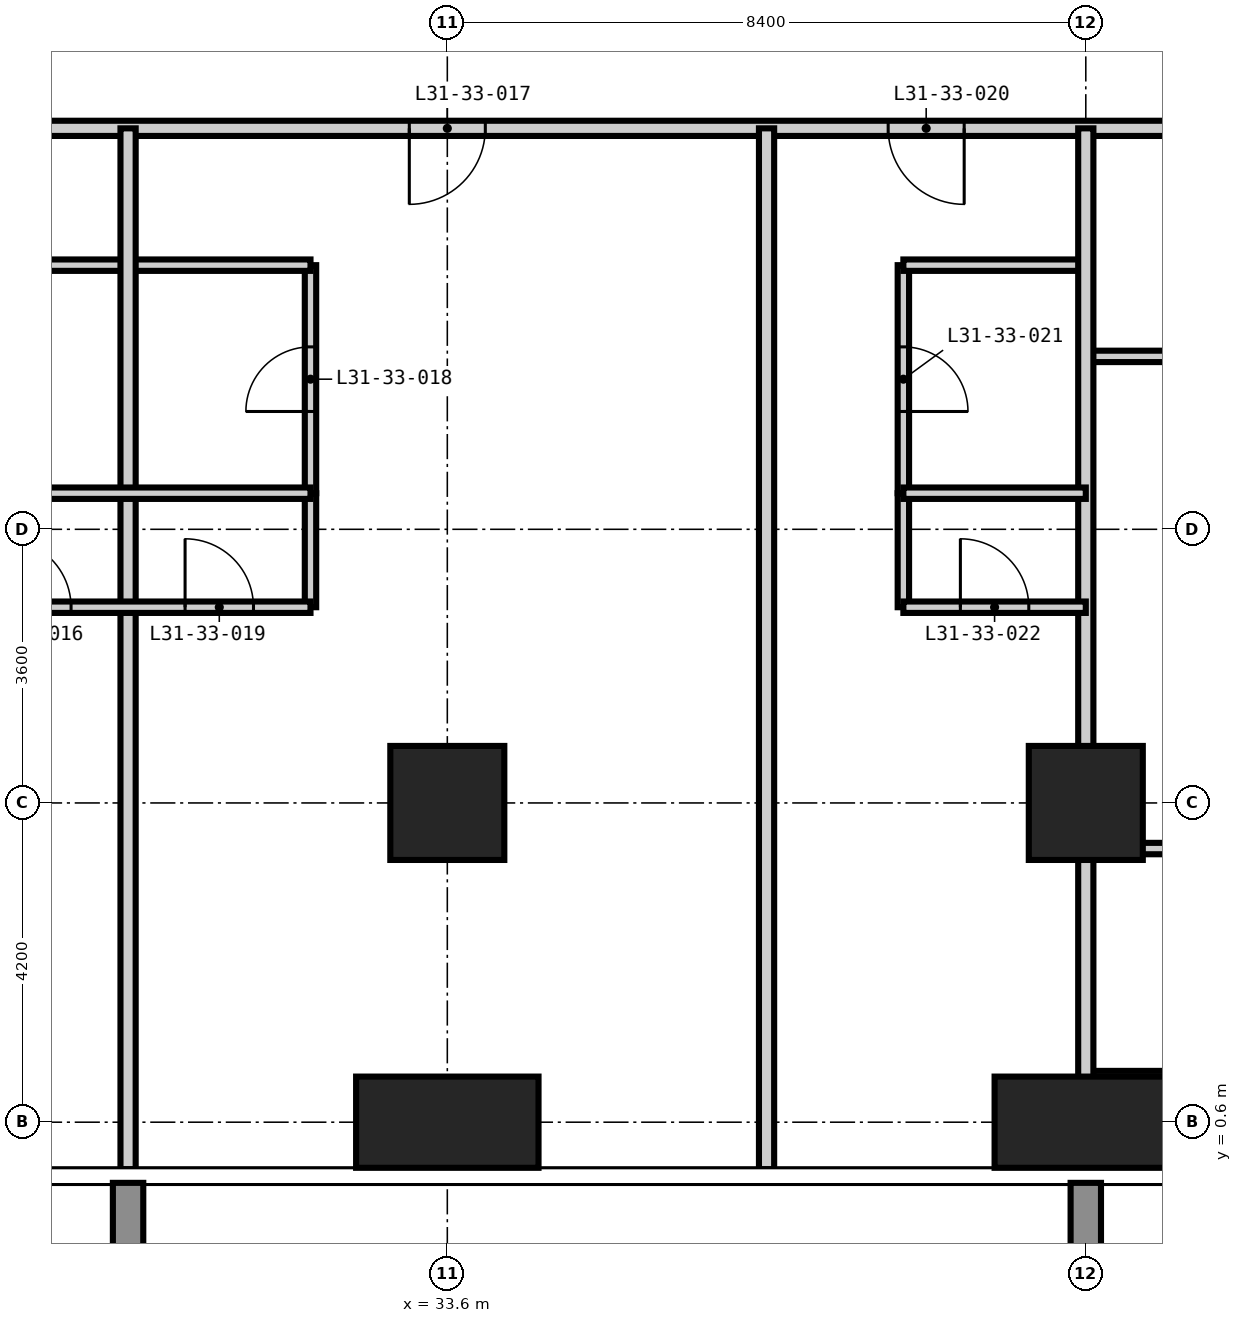
"""IFC4 building model, lengths in metres.
Left out: names, types, materials, properties, quantities, classifications, styles, units other than length and angle.
Written with IfcOpenShell. Run it as: python <this file> out.ifc"""

import sys

from ifc_helpers import new_model, si_unit, direction, frame, frame_2d, origin, origin_2d, place, context, subcontext, project, spatial, rectangle, extrude, element, fill, save


model = new_model("IFC4")
c1 = context("Model", 3, precision=1e-05, world=origin(), true_north=direction((0.0, 1.0)))
c2 = subcontext(c1, "Body", "Model", "MODEL_VIEW")
j1 = project(units=[si_unit("LENGTHUNIT", "METRE"), si_unit("PLANEANGLEUNIT", "RADIAN")], contexts=[c1])
p1 = place(None, origin())
s1 = spatial("IfcSite", under=j1, at=p1, CompositionType="ELEMENT")
p2 = place(p1, origin())
s2 = spatial("IfcBuilding", under=s1, at=p2, CompositionType="ELEMENT")
p3 = place(p2, frame((0.0, 0.0, 122.4)))
s3 = spatial("IfcBuildingStorey", under=s2, at=p3, CompositionType="ELEMENT", Elevation=122.4)
p4 = place(p3, frame((33.6, 0.6, -0.35), z_axis=(0.0, 0.0, 1.0), x_axis=(1.0, 0.0, 0.0)))
e1 = element("IfcColumn", 1, at=p4, inside=s3, PredefinedType="COLUMN", context=c2, shape_type="SweptSolid", body=[
    extrude(rectangle(XDim=2.4, YDim=1.2, at=origin_2d()), origin(), (0.0, 0.0, 1.0), 3.6),
])
p5 = place(p3, frame((33.6, 4.8, -0.35), z_axis=(0.0, 0.0, 1.0), x_axis=(1.0, 0.0, 0.0)))
e2 = element("IfcColumn", 2, at=p5, inside=s3, PredefinedType="COLUMN", context=c2, shape_type="SweptSolid", body=[
    extrude(rectangle(XDim=1.5, YDim=1.5, at=origin_2d()), origin(), (0.0, 0.0, 1.0), 3.6),
])
p6 = place(p3, frame((42.0, 0.6, -0.35), z_axis=(0.0, 0.0, 1.0), x_axis=(1.0, 0.0, 0.0)))
e3 = element("IfcColumn", 3, at=p6, inside=s3, PredefinedType="COLUMN", context=c2, shape_type="SweptSolid", body=[
    extrude(rectangle(XDim=2.4, YDim=1.2, at=origin_2d()), origin(), (0.0, 0.0, 1.0), 3.6),
])
p7 = place(p3, frame((42.0, 4.8, -0.35), z_axis=(0.0, 0.0, 1.0), x_axis=(1.0, 0.0, 0.0)))
e4 = element("IfcColumn", 4, at=p7, inside=s3, PredefinedType="COLUMN", context=c2, shape_type="SweptSolid", body=[
    extrude(rectangle(XDim=1.5, YDim=1.5, at=origin_2d()), origin(), (0.0, 0.0, 1.0), 3.6),
])
p8 = place(p3, frame((31.8, 8.875, 0.0), z_axis=(0.0, 0.0, 1.0), x_axis=(0.0, 1.0, 0.0)))
e5 = element("IfcWall", 5, at=p8, inside=s3, PredefinedType="PARTITIONING", context=c2, shape_type="SweptSolid", body=[
    extrude(rectangle(XDim=3.0, YDim=0.15, at=frame_2d((1.5, 0.0))), origin(), (0.0, 0.0, 1.0), 3.25),
])
p9 = place(p8, frame((1.075, 0.0, 0.0)))
e6 = element("IfcOpeningElement", 6, at=p9, cuts=e5, PredefinedType="OPENING", context=c2, shape_type="SweptSolid", body=[
    extrude(rectangle(XDim=0.85, YDim=2.1, at=frame_2d((0.425, 1.05))), frame((0.0, 0.085, 0.0), z_axis=(0.0, -1.0, 0.0), x_axis=(1.0, 0.0, 0.0)), (0.0, 0.0, 1.0), 0.17),
])
p10 = place(p3, frame((39.6, 8.875, 0.0), z_axis=(0.0, 0.0, 1.0), x_axis=(0.0, 1.0, 0.0)))
e7 = element("IfcWall", 7, at=p10, inside=s3, PredefinedType="PARTITIONING", context=c2, shape_type="SweptSolid", body=[
    extrude(rectangle(XDim=3.0, YDim=0.15, at=frame_2d((1.5, 0.0))), origin(), (0.0, 0.0, 1.0), 3.25),
])
p11 = place(p10, frame((1.075, 0.0, 0.0)))
e8 = element("IfcOpeningElement", 8, at=p11, cuts=e7, PredefinedType="OPENING", context=c2, shape_type="SweptSolid", body=[
    extrude(rectangle(XDim=0.85, YDim=2.1, at=frame_2d((0.425, 1.05))), frame((0.0, 0.085, 0.0), z_axis=(0.0, -1.0, 0.0), x_axis=(1.0, 0.0, 0.0)), (0.0, 0.0, 1.0), 0.17),
])
p12 = place(p3, frame((42.0, 1.2, 0.0), z_axis=(0.0, 0.0, 1.0), x_axis=(1.0, 0.0, 0.0)))
e9 = element("IfcWall", 9, at=p12, inside=s3, PredefinedType="PARTITIONING", context=c2, shape_type="SweptSolid", body=[
    extrude(rectangle(XDim=3.6, YDim=0.15, at=frame_2d((1.8, 0.0))), origin(), (0.0, 0.0, 1.0), 3.25),
])
p13 = place(p12, frame((1.375, 0.0, 0.0)))
e10 = element("IfcOpeningElement", 10, at=p13, cuts=e9, PredefinedType="OPENING", context=c2, shape_type="SweptSolid", body=[
    extrude(rectangle(XDim=0.85, YDim=2.1, at=frame_2d((0.425, 1.05))), frame((0.0, 0.085, 0.0), z_axis=(0.0, -1.0, 0.0), x_axis=(1.0, 0.0, 0.0)), (0.0, 0.0, 1.0), 0.17),
])
p14 = place(p3, frame((42.0, 10.675, 0.0), z_axis=(0.0, 0.0, 1.0), x_axis=(1.0, 0.0, 0.0)))
e11 = element("IfcWall", 11, at=p14, inside=s3, PredefinedType="PARTITIONING", context=c2, shape_type="SweptSolid", body=[
    extrude(rectangle(XDim=2.525, YDim=0.15, at=frame_2d((1.262, 0.0))), origin(), (0.0, 0.0, 1.0), 3.25),
])
p15 = place(p3, frame((27.0, 11.875, 0.0), z_axis=(0.0, 0.0, 1.0), x_axis=(1.0, 0.0, 0.0)))
e12 = element("IfcWall", 12, at=p15, inside=s3, PredefinedType="PARTITIONING", context=c2, shape_type="SweptSolid", body=[
    extrude(rectangle(XDim=4.8, YDim=0.15, at=frame_2d((2.4, 0.0))), origin(), (0.0, 0.0, 1.0), 3.25),
])
p16 = place(p3, frame((39.6, 11.875, 0.0), z_axis=(0.0, 0.0, 1.0), x_axis=(1.0, 0.0, 0.0)))
e13 = element("IfcWall", 13, at=p16, inside=s3, PredefinedType="PARTITIONING", context=c2, shape_type="SweptSolid", body=[
    extrude(rectangle(XDim=2.4, YDim=0.15, at=frame_2d((1.2, 0.0))), origin(), (0.0, 0.0, 1.0), 3.25),
])
p17 = place(p3, frame((44.525, 13.675, 0.0), z_axis=(0.0, 0.0, 1.0), x_axis=(-1.0, 0.0, 0.0)))
e14 = element("IfcWall", 14, at=p17, inside=s3, PredefinedType="PARTITIONING", context=c2, shape_type="SweptSolid", body=[
    extrude(rectangle(XDim=31.925, YDim=0.2, at=frame_2d((15.962, 0.0))), origin(), (0.0, 0.0, 1.0), 3.25),
])
p18 = place(p17, frame((25.125, 0.0, 0.0)))
e15 = element("IfcOpeningElement", 15, at=p18, cuts=e14, PredefinedType="OPENING", context=c2, shape_type="SweptSolid", body=[
    extrude(rectangle(XDim=1.0, YDim=2.2, at=frame_2d((0.5, 1.1))), frame((0.0, 0.11, 0.0), z_axis=(0.0, -1.0, 0.0), x_axis=(1.0, 0.0, 0.0)), (0.0, 0.0, 1.0), 0.22),
])
p19 = place(p17, frame((18.825, 0.0, 0.0)))
e16 = element("IfcOpeningElement", 16, at=p19, cuts=e14, PredefinedType="OPENING", context=c2, shape_type="SweptSolid", body=[
    extrude(rectangle(XDim=1.0, YDim=2.2, at=frame_2d((0.5, 1.1))), frame((0.0, 0.11, 0.0), z_axis=(0.0, -1.0, 0.0), x_axis=(1.0, 0.0, 0.0)), (0.0, 0.0, 1.0), 0.22),
])
p20 = place(p17, frame((10.425, 0.0, 0.0)))
e17 = element("IfcOpeningElement", 17, at=p20, cuts=e14, PredefinedType="OPENING", context=c2, shape_type="SweptSolid", body=[
    extrude(rectangle(XDim=1.0, YDim=2.2, at=frame_2d((0.5, 1.1))), frame((0.0, 0.11, 0.0), z_axis=(0.0, -1.0, 0.0), x_axis=(1.0, 0.0, 0.0)), (0.0, 0.0, 1.0), 0.22),
])
p21 = place(p17, frame((4.125, 0.0, 0.0)))
e18 = element("IfcOpeningElement", 18, at=p21, cuts=e14, PredefinedType="OPENING", context=c2, shape_type="SweptSolid", body=[
    extrude(rectangle(XDim=1.0, YDim=2.2, at=frame_2d((0.5, 1.1))), frame((0.0, 0.11, 0.0), z_axis=(0.0, -1.0, 0.0), x_axis=(1.0, 0.0, 0.0)), (0.0, 0.0, 1.0), 0.22),
])
for number, where, z_axis, x_axis in (
    (19, (29.4, -0.018, 0.0), (0.0, 0.0, 1.0), (0.0, 1.0, 0.0)),
    (20, (37.8, -0.018, 0.0), (0.0, 0.0, 1.0), (0.0, 1.0, 0.0)),
    (21, (42.0, -0.018, 0.0), (0.0, 0.0, 1.0), (0.0, 1.0, 0.0)),
):
    element("IfcWall", number, at=place(p3, frame(where, z_axis=z_axis, x_axis=x_axis)), inside=s3, PredefinedType="PARTITIONING", context=c2, shape_type="SweptSolid", body=[
        extrude(rectangle(XDim=13.693, YDim=0.2, at=frame_2d((6.847, 0.0))), origin(), (0.0, 0.0, 1.0), 3.25),
    ])
for number, where, z_axis, x_axis in (
    (22, (31.8, 7.375, 0.0), (0.0, 0.0, 1.0), (0.0, 1.0, 0.0)),
    (23, (39.6, 7.375, 0.0), (0.0, 0.0, 1.0), (0.0, 1.0, 0.0)),
):
    element("IfcWall", number, at=place(p3, frame(where, z_axis=z_axis, x_axis=x_axis)), inside=s3, PredefinedType="PARTITIONING", context=c2, shape_type="SweptSolid", body=[
        extrude(rectangle(XDim=1.5, YDim=0.15, at=frame_2d((0.75, 0.0))), origin(), (0.0, 0.0, 1.0), 3.25),
    ])
p22 = place(p3, frame((42.0, 4.2, 0.0), z_axis=(0.0, 0.0, 1.0), x_axis=(1.0, 0.0, 0.0)))
e24 = element("IfcWall", 24, at=p22, inside=s3, PredefinedType="PARTITIONING", context=c2, shape_type="SweptSolid", body=[
    extrude(rectangle(XDim=12.618, YDim=0.15, at=frame_2d((6.309, 0.0))), origin(), (0.0, 0.0, 1.0), 3.25),
])
p23 = place(p22, frame((9.25, 0.0, 0.0)))
e25 = element("IfcOpeningElement", 25, at=p23, cuts=e24, PredefinedType="OPENING", context=c2, shape_type="SweptSolid", body=[
    extrude(rectangle(XDim=0.9, YDim=2.1, at=frame_2d((0.45, 1.05))), frame((0.0, 0.085, 0.0), z_axis=(0.0, -1.0, 0.0), x_axis=(1.0, 0.0, 0.0)), (0.0, 0.0, 1.0), 0.17),
])
p24 = place(p3, frame((27.0, 7.375, 0.0), z_axis=(0.0, 0.0, 1.0), x_axis=(1.0, 0.0, 0.0)))
e26 = element("IfcWall", 26, at=p24, inside=s3, PredefinedType="PARTITIONING", context=c2, shape_type="SweptSolid", body=[
    extrude(rectangle(XDim=4.8, YDim=0.15, at=frame_2d((2.4, 0.0))), origin(), (0.0, 0.0, 1.0), 3.25),
])
p25 = place(p24, frame((0.75, 0.0, 0.0)))
e27 = element("IfcOpeningElement", 27, at=p25, cuts=e26, PredefinedType="OPENING", context=c2, shape_type="SweptSolid", body=[
    extrude(rectangle(XDim=0.9, YDim=2.1, at=frame_2d((0.45, 1.05))), frame((0.0, 0.085, 0.0), z_axis=(0.0, -1.0, 0.0), x_axis=(1.0, 0.0, 0.0)), (0.0, 0.0, 1.0), 0.17),
])
p26 = place(p24, frame((3.15, 0.0, 0.0)))
e28 = element("IfcOpeningElement", 28, at=p26, cuts=e26, PredefinedType="OPENING", context=c2, shape_type="SweptSolid", body=[
    extrude(rectangle(XDim=0.9, YDim=2.1, at=frame_2d((0.45, 1.05))), frame((0.0, 0.085, 0.0), z_axis=(0.0, -1.0, 0.0), x_axis=(1.0, 0.0, 0.0)), (0.0, 0.0, 1.0), 0.17),
])
p27 = place(p3, frame((39.6, 7.375, 0.0), z_axis=(0.0, 0.0, 1.0), x_axis=(1.0, 0.0, 0.0)))
e29 = element("IfcWall", 29, at=p27, inside=s3, PredefinedType="PARTITIONING", context=c2, shape_type="SweptSolid", body=[
    extrude(rectangle(XDim=2.4, YDim=0.15, at=frame_2d((1.2, 0.0))), origin(), (0.0, 0.0, 1.0), 3.25),
])
p28 = place(p27, frame((0.75, 0.0, 0.0)))
e30 = element("IfcOpeningElement", 30, at=p28, cuts=e29, PredefinedType="OPENING", context=c2, shape_type="SweptSolid", body=[
    extrude(rectangle(XDim=0.9, YDim=2.1, at=frame_2d((0.45, 1.05))), frame((0.0, 0.085, 0.0), z_axis=(0.0, -1.0, 0.0), x_axis=(1.0, 0.0, 0.0)), (0.0, 0.0, 1.0), 0.17),
])
p29 = place(p3, frame((27.0, 8.875, 0.0), z_axis=(0.0, 0.0, 1.0), x_axis=(1.0, 0.0, 0.0)))
e31 = element("IfcWall", 31, at=p29, inside=s3, PredefinedType="PARTITIONING", context=c2, shape_type="SweptSolid", body=[
    extrude(rectangle(XDim=4.8, YDim=0.15, at=frame_2d((2.4, 0.0))), origin(), (0.0, 0.0, 1.0), 3.25),
])
p30 = place(p3, frame((39.6, 8.875, 0.0), z_axis=(0.0, 0.0, 1.0), x_axis=(1.0, 0.0, 0.0)))
e32 = element("IfcWall", 32, at=p30, inside=s3, PredefinedType="PARTITIONING", context=c2, shape_type="SweptSolid", body=[
    extrude(rectangle(XDim=2.4, YDim=0.15, at=frame_2d((1.2, 0.0))), origin(), (0.0, 0.0, 1.0), 3.25),
])
p31 = place(p25, origin())
e33 = element("IfcDoor", 33, at=p31, inside=s3, OperationType="SINGLE_SWING_LEFT", PredefinedType="DOOR", context=c2, shape_type="SweptSolid", body=[
    extrude(rectangle(XDim=0.9, YDim=2.1, at=frame_2d((0.45, 1.05))), frame((0.0, 0.025, 0.0), z_axis=(0.0, -1.0, 0.0), x_axis=(1.0, 0.0, 0.0)), (0.0, 0.0, 1.0), 0.05),
])
fill(e27, e33)
p32 = place(p20, origin())
e34 = element("IfcDoor", 34, at=p32, inside=s3, OperationType="SINGLE_SWING_RIGHT", PredefinedType="DOOR", context=c2, shape_type="SweptSolid", body=[
    extrude(rectangle(XDim=1.0, YDim=2.2, at=frame_2d((0.5, 1.1))), frame((0.0, 0.025, 0.0), z_axis=(0.0, -1.0, 0.0), x_axis=(1.0, 0.0, 0.0)), (0.0, 0.0, 1.0), 0.05),
])
fill(e17, e34)
p33 = place(p9, origin())
e35 = element("IfcDoor", 35, at=p33, inside=s3, OperationType="SINGLE_SWING_LEFT", PredefinedType="DOOR", context=c2, shape_type="SweptSolid", body=[
    extrude(rectangle(XDim=0.85, YDim=2.1, at=frame_2d((0.425, 1.05))), frame((0.0, 0.025, 0.0), z_axis=(0.0, -1.0, 0.0), x_axis=(1.0, 0.0, 0.0)), (0.0, 0.0, 1.0), 0.05),
])
fill(e6, e35)
p34 = place(p26, origin())
e36 = element("IfcDoor", 36, at=p34, inside=s3, OperationType="SINGLE_SWING_LEFT", PredefinedType="DOOR", context=c2, shape_type="SweptSolid", body=[
    extrude(rectangle(XDim=0.9, YDim=2.1, at=frame_2d((0.45, 1.05))), frame((0.0, 0.025, 0.0), z_axis=(0.0, -1.0, 0.0), x_axis=(1.0, 0.0, 0.0)), (0.0, 0.0, 1.0), 0.05),
])
fill(e28, e36)
p35 = place(p21, origin())
e37 = element("IfcDoor", 37, at=p35, inside=s3, OperationType="SINGLE_SWING_LEFT", PredefinedType="DOOR", context=c2, shape_type="SweptSolid", body=[
    extrude(rectangle(XDim=1.0, YDim=2.2, at=frame_2d((0.5, 1.1))), frame((0.0, 0.025, 0.0), z_axis=(0.0, -1.0, 0.0), x_axis=(1.0, 0.0, 0.0)), (0.0, 0.0, 1.0), 0.05),
])
fill(e18, e37)
p36 = place(p11, frame((0.85, 0.0, 0.0), z_axis=(0.0, 0.0, 1.0), x_axis=(-1.0, 0.0, 0.0)))
e38 = element("IfcDoor", 38, at=p36, inside=s3, OperationType="SINGLE_SWING_RIGHT", PredefinedType="DOOR", context=c2, shape_type="SweptSolid", body=[
    extrude(rectangle(XDim=0.85, YDim=2.1, at=frame_2d((0.425, 1.05))), frame((0.0, 0.025, 0.0), z_axis=(0.0, -1.0, 0.0), x_axis=(1.0, 0.0, 0.0)), (0.0, 0.0, 1.0), 0.05),
])
fill(e8, e38)
p37 = place(p28, origin())
e39 = element("IfcDoor", 39, at=p37, inside=s3, OperationType="SINGLE_SWING_LEFT", PredefinedType="DOOR", context=c2, shape_type="SweptSolid", body=[
    extrude(rectangle(XDim=0.9, YDim=2.1, at=frame_2d((0.45, 1.05))), frame((0.0, 0.025, 0.0), z_axis=(0.0, -1.0, 0.0), x_axis=(1.0, 0.0, 0.0)), (0.0, 0.0, 1.0), 0.05),
])
fill(e30, e39)
save(model, sys.argv[1])
